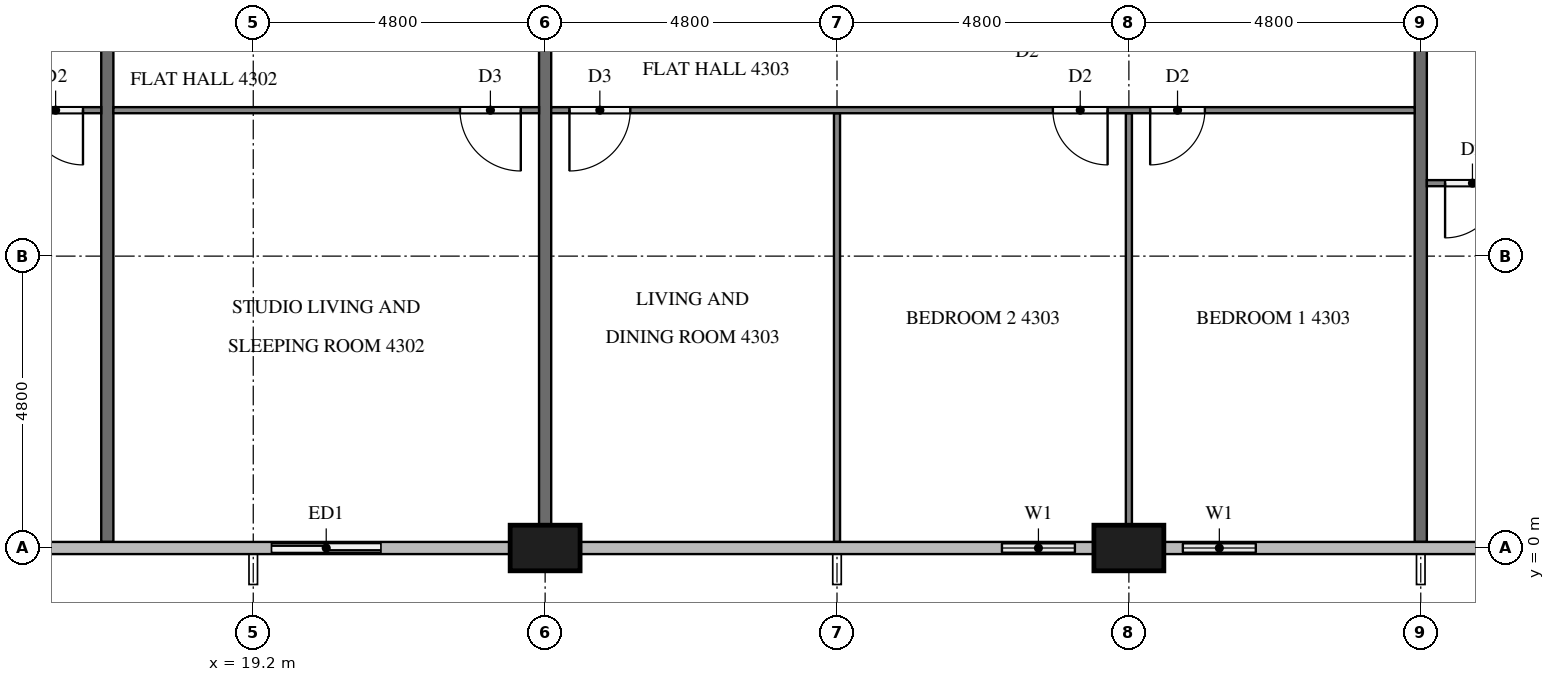
"""IFC4 building model, lengths in metres.
Left out: names, types, materials, properties, quantities, classifications, styles, units other than length and angle.
Written with IfcOpenShell. Run it as: python <this file> out.ifc"""

import sys

from ifc_helpers import new_model, si_unit, direction, frame, frame_2d, origin, origin_2d, place, context, subcontext, project, spatial, rectangle, extrude, element, fill, save


model = new_model("IFC4")
c1 = context("Model", 3, precision=1e-05, world=origin(), true_north=direction((0.0, 1.0)))
c2 = subcontext(c1, "Body", "Model", "MODEL_VIEW")
j1 = project(units=[si_unit("LENGTHUNIT", "METRE"), si_unit("PLANEANGLEUNIT", "RADIAN")], contexts=[c1])
p1 = place(None, origin())
s1 = spatial("IfcSite", under=j1, at=p1, CompositionType="ELEMENT")
p2 = place(p1, origin())
s2 = spatial("IfcBuilding", under=s1, at=p2, CompositionType="ELEMENT")
p3 = place(p2, frame((0.0, 0.0, 166.5)))
s3 = spatial("IfcBuildingStorey", under=s2, at=p3, CompositionType="ELEMENT", Elevation=166.5)
for number, where, z_axis, x_axis in (
    (1, (24.0, 0.0, 0.0), (0.0, 0.0, 1.0), (1.0, 0.0, 0.0)),
    (2, (33.6, 0.0, 0.0), (0.0, 0.0, 1.0), (1.0, 0.0, 0.0)),
):
    element("IfcColumn", number, at=place(p3, frame(where, z_axis=z_axis, x_axis=x_axis)), inside=s3, PredefinedType="COLUMN", context=c2, shape_type="SweptSolid", body=[
        extrude(rectangle(XDim=1.15, YDim=0.75, at=origin_2d()), origin(), (0.0, 0.0, 1.0), 3.2),
    ])
p4 = place(p3, frame((19.2, 0.0, 0.0), z_axis=(0.0, 0.0, 1.0), x_axis=(1.0, 0.0, 0.0)))
e3 = element("IfcWall", 3, at=p4, inside=s3, PredefinedType="SOLIDWALL", context=c2, shape_type="SweptSolid", body=[
    extrude(rectangle(XDim=2.4, YDim=0.15, at=frame_2d((1.2, 0.0))), origin(), (0.0, 0.0, 1.0), 3.2),
])
p5 = place(p4, frame((0.3, 0.0, 0.0)))
e4 = element("IfcOpeningElement", 4, at=p5, cuts=e3, PredefinedType="OPENING", context=c2, shape_type="SweptSolid", body=[
    extrude(rectangle(XDim=1.8, YDim=2.4, at=frame_2d((0.9, 1.2))), frame((0.0, 0.085, 0.0), z_axis=(0.0, -1.0, 0.0), x_axis=(1.0, 0.0, 0.0)), (0.0, 0.0, 1.0), 0.17),
])
p6 = place(p3, frame((31.2, 0.0, 0.0), z_axis=(0.0, 0.0, 1.0), x_axis=(1.0, 0.0, 0.0)))
e5 = element("IfcWall", 5, at=p6, inside=s3, PredefinedType="SOLIDWALL", context=c2, shape_type="SweptSolid", body=[
    extrude(rectangle(XDim=1.825, YDim=0.15, at=frame_2d((0.913, 0.0))), origin(), (0.0, 0.0, 1.0), 3.2),
])
p7 = place(p6, frame((0.312, 0.0, 0.9)))
e6 = element("IfcOpeningElement", 6, at=p7, cuts=e5, PredefinedType="OPENING", context=c2, shape_type="SweptSolid", body=[
    extrude(rectangle(XDim=1.2, YDim=1.4, at=frame_2d((0.6, 0.7))), frame((0.0, 0.085, 0.0), z_axis=(0.0, -1.0, 0.0), x_axis=(1.0, 0.0, 0.0)), (0.0, 0.0, 1.0), 0.17),
])
p8 = place(p3, frame((34.175, 0.0, 0.0), z_axis=(0.0, 0.0, 1.0), x_axis=(1.0, 0.0, 0.0)))
e7 = element("IfcWall", 7, at=p8, inside=s3, PredefinedType="SOLIDWALL", context=c2, shape_type="SweptSolid", body=[
    extrude(rectangle(XDim=1.825, YDim=0.15, at=frame_2d((0.913, 0.0))), origin(), (0.0, 0.0, 1.0), 3.2),
])
p9 = place(p8, frame((0.312, 0.0, 0.9)))
e8 = element("IfcOpeningElement", 8, at=p9, cuts=e7, PredefinedType="OPENING", context=c2, shape_type="SweptSolid", body=[
    extrude(rectangle(XDim=1.2, YDim=1.4, at=frame_2d((0.6, 0.7))), frame((0.0, 0.085, 0.0), z_axis=(0.0, -1.0, 0.0), x_axis=(1.0, 0.0, 0.0)), (0.0, 0.0, 1.0), 0.17),
])
p10 = place(p3, frame((16.8, 11.9, 0.0), z_axis=(0.0, 0.0, 1.0), x_axis=(0.0, -1.0, 0.0)))
e9 = element("IfcWall", 9, at=p10, inside=s3, PredefinedType="PARTITIONING", context=c2, shape_type="SweptSolid", body=[
    extrude(rectangle(XDim=11.8, YDim=0.2, at=frame_2d((5.9, 0.0))), origin(), (0.0, 0.0, 1.0), 3.2),
])
p11 = place(p3, frame((24.0, 11.9, 0.0), z_axis=(0.0, 0.0, 1.0), x_axis=(0.0, -1.0, 0.0)))
e10 = element("IfcWall", 10, at=p11, inside=s3, PredefinedType="PARTITIONING", context=c2, shape_type="SweptSolid", body=[
    extrude(rectangle(XDim=11.525, YDim=0.2, at=frame_2d((5.762, 0.0))), origin(), (0.0, 0.0, 1.0), 3.2),
])
p12 = place(p3, frame((38.4, 11.9, 0.0), z_axis=(0.0, 0.0, 1.0), x_axis=(0.0, -1.0, 0.0)))
e11 = element("IfcWall", 11, at=p12, inside=s3, PredefinedType="PARTITIONING", context=c2, shape_type="SweptSolid", body=[
    extrude(rectangle(XDim=11.8, YDim=0.2, at=frame_2d((5.9, 0.0))), origin(), (0.0, 0.0, 1.0), 3.2),
])
p13 = place(p3, frame((16.7, 7.2, 0.0), z_axis=(0.0, 0.0, 1.0), x_axis=(-1.0, 0.0, 0.0)))
e12 = element("IfcWall", 12, at=p13, inside=s3, PredefinedType="PARTITIONING", context=c2, shape_type="SweptSolid", body=[
    extrude(rectangle(XDim=16.6, YDim=0.1, at=frame_2d((8.3, 0.0))), origin(), (0.0, 0.0, 1.0), 3.2),
])
p14 = place(p13, frame((0.3, 0.0, 0.0)))
e13 = element("IfcOpeningElement", 13, at=p14, cuts=e12, PredefinedType="OPENING", context=c2, shape_type="SweptSolid", body=[
    extrude(rectangle(XDim=0.9, YDim=2.1, at=frame_2d((0.45, 1.05))), frame((0.0, 0.06, 0.0), z_axis=(0.0, -1.0, 0.0), x_axis=(1.0, 0.0, 0.0)), (0.0, 0.0, 1.0), 0.12),
])
p15 = place(p13, frame((10.55, 0.0, 0.0)))
e14 = element("IfcOpeningElement", 14, at=p15, cuts=e12, PredefinedType="OPENING", context=c2, shape_type="SweptSolid", body=[
    extrude(rectangle(XDim=1.0, YDim=2.1, at=frame_2d((0.5, 1.05))), frame((0.0, 0.06, 0.0), z_axis=(0.0, -1.0, 0.0), x_axis=(1.0, 0.0, 0.0)), (0.0, 0.0, 1.0), 0.12),
])
p16 = place(p13, frame((12.25, 0.0, 0.0)))
e15 = element("IfcOpeningElement", 15, at=p16, cuts=e12, PredefinedType="OPENING", context=c2, shape_type="SweptSolid", body=[
    extrude(rectangle(XDim=0.9, YDim=2.1, at=frame_2d((0.45, 1.05))), frame((0.0, 0.06, 0.0), z_axis=(0.0, -1.0, 0.0), x_axis=(1.0, 0.0, 0.0)), (0.0, 0.0, 1.0), 0.12),
])
p17 = place(p3, frame((23.9, 7.2, 0.0), z_axis=(0.0, 0.0, 1.0), x_axis=(-1.0, 0.0, 0.0)))
e16 = element("IfcWall", 16, at=p17, inside=s3, PredefinedType="PARTITIONING", context=c2, shape_type="SweptSolid", body=[
    extrude(rectangle(XDim=7.0, YDim=0.1, at=frame_2d((3.5, 0.0))), origin(), (0.0, 0.0, 1.0), 3.2),
])
p18 = place(p17, frame((0.3, 0.0, 0.0)))
e17 = element("IfcOpeningElement", 17, at=p18, cuts=e16, PredefinedType="OPENING", context=c2, shape_type="SweptSolid", body=[
    extrude(rectangle(XDim=1.0, YDim=2.1, at=frame_2d((0.5, 1.05))), frame((0.0, 0.06, 0.0), z_axis=(0.0, -1.0, 0.0), x_axis=(1.0, 0.0, 0.0)), (0.0, 0.0, 1.0), 0.12),
])
p19 = place(p3, frame((33.6, 7.15, 0.0), z_axis=(0.0, 0.0, 1.0), x_axis=(0.0, -1.0, 0.0)))
e18 = element("IfcWall", 18, at=p19, inside=s3, PredefinedType="PARTITIONING", context=c2, shape_type="SweptSolid", body=[
    extrude(rectangle(XDim=6.775, YDim=0.1, at=frame_2d((3.387, 0.0))), origin(), (0.0, 0.0, 1.0), 3.2),
])
p20 = place(p3, frame((28.8, 7.15, 0.0), z_axis=(0.0, 0.0, 1.0), x_axis=(0.0, -1.0, 0.0)))
e19 = element("IfcWall", 19, at=p20, inside=s3, PredefinedType="PARTITIONING", context=c2, shape_type="SweptSolid", body=[
    extrude(rectangle(XDim=7.05, YDim=0.1, at=frame_2d((3.525, 0.0))), origin(), (0.0, 0.0, 1.0), 3.2),
])
p21 = place(p3, frame((38.3, 7.2, 0.0), z_axis=(0.0, 0.0, 1.0), x_axis=(-1.0, 0.0, 0.0)))
e20 = element("IfcWall", 20, at=p21, inside=s3, PredefinedType="PARTITIONING", context=c2, shape_type="SweptSolid", body=[
    extrude(rectangle(XDim=14.2, YDim=0.1, at=frame_2d((7.1, 0.0))), origin(), (0.0, 0.0, 1.0), 3.2),
])
p22 = place(p21, frame((3.45, 0.0, 0.0)))
e21 = element("IfcOpeningElement", 21, at=p22, cuts=e20, PredefinedType="OPENING", context=c2, shape_type="SweptSolid", body=[
    extrude(rectangle(XDim=0.9, YDim=2.1, at=frame_2d((0.45, 1.05))), frame((0.0, 0.06, 0.0), z_axis=(0.0, -1.0, 0.0), x_axis=(1.0, 0.0, 0.0)), (0.0, 0.0, 1.0), 0.12),
])
p23 = place(p21, frame((5.05, 0.0, 0.0)))
e22 = element("IfcOpeningElement", 22, at=p23, cuts=e20, PredefinedType="OPENING", context=c2, shape_type="SweptSolid", body=[
    extrude(rectangle(XDim=0.9, YDim=2.1, at=frame_2d((0.45, 1.05))), frame((0.0, 0.06, 0.0), z_axis=(0.0, -1.0, 0.0), x_axis=(1.0, 0.0, 0.0)), (0.0, 0.0, 1.0), 0.12),
])
p24 = place(p21, frame((12.9, 0.0, 0.0)))
e23 = element("IfcOpeningElement", 23, at=p24, cuts=e20, PredefinedType="OPENING", context=c2, shape_type="SweptSolid", body=[
    extrude(rectangle(XDim=1.0, YDim=2.1, at=frame_2d((0.5, 1.05))), frame((0.0, 0.06, 0.0), z_axis=(0.0, -1.0, 0.0), x_axis=(1.0, 0.0, 0.0)), (0.0, 0.0, 1.0), 0.12),
])
p25 = place(p3, frame((57.5, 6.0, 0.0), z_axis=(0.0, 0.0, 1.0), x_axis=(-1.0, 0.0, 0.0)))
e24 = element("IfcWall", 24, at=p25, inside=s3, PredefinedType="PARTITIONING", context=c2, shape_type="SweptSolid", body=[
    extrude(rectangle(XDim=19.0, YDim=0.1, at=frame_2d((9.5, 0.0))), origin(), (0.0, 0.0, 1.0), 3.2),
])
p26 = place(p25, frame((17.8, 0.0, 0.0)))
e25 = element("IfcOpeningElement", 25, at=p26, cuts=e24, PredefinedType="OPENING", context=c2, shape_type="SweptSolid", body=[
    extrude(rectangle(XDim=0.9, YDim=2.1, at=frame_2d((0.45, 1.05))), frame((0.0, 0.06, 0.0), z_axis=(0.0, -1.0, 0.0), x_axis=(1.0, 0.0, 0.0)), (0.0, 0.0, 1.0), 0.12),
])
p27 = place(p25, frame((9.85, 0.0, 0.0)))
e26 = element("IfcOpeningElement", 26, at=p27, cuts=e24, PredefinedType="OPENING", context=c2, shape_type="SweptSolid", body=[
    extrude(rectangle(XDim=1.0, YDim=2.1, at=frame_2d((0.5, 1.05))), frame((0.0, 0.06, 0.0), z_axis=(0.0, -1.0, 0.0), x_axis=(1.0, 0.0, 0.0)), (0.0, 0.0, 1.0), 0.12),
])
p28 = place(p25, frame((8.25, 0.0, 0.0)))
e27 = element("IfcOpeningElement", 27, at=p28, cuts=e24, PredefinedType="OPENING", context=c2, shape_type="SweptSolid", body=[
    extrude(rectangle(XDim=0.9, YDim=2.1, at=frame_2d((0.45, 1.05))), frame((0.0, 0.06, 0.0), z_axis=(0.0, -1.0, 0.0), x_axis=(1.0, 0.0, 0.0)), (0.0, 0.0, 1.0), 0.12),
])
p29 = place(p25, frame((0.5, 0.0, 0.0)))
e28 = element("IfcOpeningElement", 28, at=p29, cuts=e24, PredefinedType="OPENING", context=c2, shape_type="SweptSolid", body=[
    extrude(rectangle(XDim=0.9, YDim=2.1, at=frame_2d((0.45, 1.05))), frame((0.0, 0.06, 0.0), z_axis=(0.0, -1.0, 0.0), x_axis=(1.0, 0.0, 0.0)), (0.0, 0.0, 1.0), 0.12),
])
p30 = place(p5, origin())
e29 = element("IfcDoor", 29, at=p30, inside=s3, OperationType="SLIDING_TO_RIGHT", PredefinedType="DOOR", context=c2, shape_type="SweptSolid", body=[
    extrude(rectangle(XDim=1.8, YDim=2.4, at=frame_2d((0.9, 1.2))), frame((0.0, 0.025, 0.0), z_axis=(0.0, -1.0, 0.0), x_axis=(1.0, 0.0, 0.0)), (0.0, 0.0, 1.0), 0.05),
])
fill(e4, e29)
p31 = place(p7, origin())
e30 = element("IfcWindow", 30, at=p31, inside=s3, PartitioningType="SINGLE_PANEL", PredefinedType="WINDOW", context=c2, shape_type="SweptSolid", body=[
    extrude(rectangle(XDim=1.2, YDim=1.4, at=frame_2d((0.6, 0.7))), frame((0.0, 0.03, 0.0), z_axis=(0.0, -1.0, 0.0), x_axis=(1.0, 0.0, 0.0)), (0.0, 0.0, 1.0), 0.06),
])
fill(e6, e30)
p32 = place(p9, origin())
e31 = element("IfcWindow", 31, at=p32, inside=s3, PartitioningType="SINGLE_PANEL", PredefinedType="WINDOW", context=c2, shape_type="SweptSolid", body=[
    extrude(rectangle(XDim=1.2, YDim=1.4, at=frame_2d((0.6, 0.7))), frame((0.0, 0.03, 0.0), z_axis=(0.0, -1.0, 0.0), x_axis=(1.0, 0.0, 0.0)), (0.0, 0.0, 1.0), 0.06),
])
fill(e8, e31)
p33 = place(p14, origin())
e32 = element("IfcDoor", 32, at=p33, inside=s3, OperationType="SINGLE_SWING_LEFT", PredefinedType="DOOR", context=c2, shape_type="SweptSolid", body=[
    extrude(rectangle(XDim=0.9, YDim=2.1, at=frame_2d((0.45, 1.05))), frame((0.0, 0.025, 0.0), z_axis=(0.0, -1.0, 0.0), x_axis=(1.0, 0.0, 0.0)), (0.0, 0.0, 1.0), 0.05),
])
fill(e13, e32)
p34 = place(p18, origin())
e33 = element("IfcDoor", 33, at=p34, inside=s3, OperationType="SINGLE_SWING_LEFT", PredefinedType="DOOR", context=c2, shape_type="SweptSolid", body=[
    extrude(rectangle(XDim=1.0, YDim=2.1, at=frame_2d((0.5, 1.05))), frame((0.0, 0.025, 0.0), z_axis=(0.0, -1.0, 0.0), x_axis=(1.0, 0.0, 0.0)), (0.0, 0.0, 1.0), 0.05),
])
fill(e17, e33)
p35 = place(p22, origin())
e34 = element("IfcDoor", 34, at=p35, inside=s3, OperationType="SINGLE_SWING_RIGHT", PredefinedType="DOOR", context=c2, shape_type="SweptSolid", body=[
    extrude(rectangle(XDim=0.9, YDim=2.1, at=frame_2d((0.45, 1.05))), frame((0.0, 0.025, 0.0), z_axis=(0.0, -1.0, 0.0), x_axis=(1.0, 0.0, 0.0)), (0.0, 0.0, 1.0), 0.05),
])
fill(e21, e34)
p36 = place(p23, origin())
e35 = element("IfcDoor", 35, at=p36, inside=s3, OperationType="SINGLE_SWING_LEFT", PredefinedType="DOOR", context=c2, shape_type="SweptSolid", body=[
    extrude(rectangle(XDim=0.9, YDim=2.1, at=frame_2d((0.45, 1.05))), frame((0.0, 0.025, 0.0), z_axis=(0.0, -1.0, 0.0), x_axis=(1.0, 0.0, 0.0)), (0.0, 0.0, 1.0), 0.05),
])
fill(e22, e35)
p37 = place(p24, origin())
e36 = element("IfcDoor", 36, at=p37, inside=s3, OperationType="SINGLE_SWING_RIGHT", PredefinedType="DOOR", context=c2, shape_type="SweptSolid", body=[
    extrude(rectangle(XDim=1.0, YDim=2.1, at=frame_2d((0.5, 1.05))), frame((0.0, 0.025, 0.0), z_axis=(0.0, -1.0, 0.0), x_axis=(1.0, 0.0, 0.0)), (0.0, 0.0, 1.0), 0.05),
])
fill(e23, e36)
p38 = place(p26, origin())
e37 = element("IfcDoor", 37, at=p38, inside=s3, OperationType="SINGLE_SWING_RIGHT", PredefinedType="DOOR", context=c2, shape_type="SweptSolid", body=[
    extrude(rectangle(XDim=0.9, YDim=2.1, at=frame_2d((0.45, 1.05))), frame((0.0, 0.025, 0.0), z_axis=(0.0, -1.0, 0.0), x_axis=(1.0, 0.0, 0.0)), (0.0, 0.0, 1.0), 0.05),
])
fill(e25, e37)
save(model, sys.argv[1])
